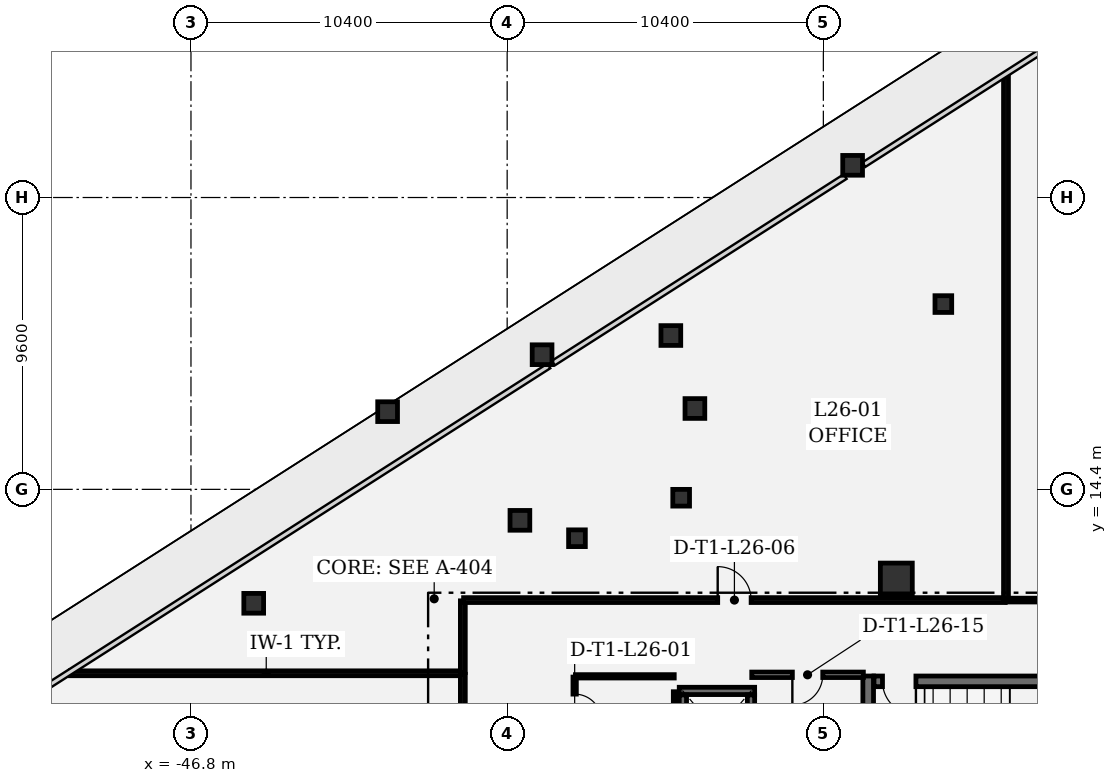
"""IFC4 building model, lengths in metres.
Left out: names, types, materials, properties, quantities, classifications, styles, units other than length and angle.
Written with IfcOpenShell. Run it as: python <this file> out.ifc"""

import sys

from ifc_helpers import new_model, si_unit, direction, frame, frame_2d, origin, origin_2d, place, context, subcontext, project, spatial, rectangle, extrude, element, fill, save


model = new_model("IFC4")
c1 = context("Model", 3, precision=1e-05, world=origin(), true_north=direction((0.0, 1.0)))
c2 = subcontext(c1, "Body", "Model", "MODEL_VIEW")
j1 = project(units=[si_unit("LENGTHUNIT", "METRE"), si_unit("PLANEANGLEUNIT", "RADIAN")], contexts=[c1])
p1 = place(None, origin())
s1 = spatial("IfcSite", under=j1, at=p1, CompositionType="ELEMENT")
p2 = place(p1, origin())
s2 = spatial("IfcBuilding", under=s1, at=p2, CompositionType="ELEMENT")
p3 = place(p2, frame((0.0, 0.0, 117.9)))
s3 = spatial("IfcBuildingStorey", under=s2, at=p3, CompositionType="ELEMENT", Elevation=117.9)
p4 = place(p3, frame((-23.6, 11.45, 0.0), z_axis=(0.0, 0.0, 1.0), x_axis=(1.0, 0.0, 0.0)))
e1 = element("IfcColumn", 1, at=p4, inside=s3, PredefinedType="COLUMN", context=c2, shape_type="SweptSolid", body=[
    extrude(rectangle(XDim=1.05, YDim=1.05, at=origin_2d()), origin(), (0.0, 0.0, 1.0), 4.05),
])
for number, where, z_axis, x_axis in (
    (2, (-40.333, 16.956, 0.0), (0.0, 0.0, 1.0), (1.0, 0.0, 0.0)),
    (3, (-35.252, 18.829, 0.0), (0.0, 0.0, 1.0), (1.0, 0.0, 0.0)),
    (4, (-25.038, 25.059, 0.0), (0.0, 0.0, 1.0), (1.0, 0.0, 0.0)),
    (5, (-31.016, 19.46, 0.0), (0.0, 0.0, 1.0), (1.0, 0.0, 0.0)),
    (6, (-44.736, 10.652, 0.0), (0.0, 0.0, 1.0), (1.0, 0.0, 0.0)),
    (7, (-35.981, 13.381, 0.0), (0.0, 0.0, 1.0), (1.0, 0.0, 0.0)),
    (8, (-30.225, 17.06, 0.0), (0.0, 0.0, 1.0), (1.0, 0.0, 0.0)),
):
    element("IfcColumn", number, at=place(p3, frame(where, z_axis=z_axis, x_axis=x_axis)), inside=s3, PredefinedType="COLUMN", context=c2, shape_type="SweptSolid", body=[
        extrude(rectangle(XDim=0.65, YDim=0.65, at=origin_2d()), origin(), (0.0, 0.0, 1.0), 4.05),
    ])
for number, where, z_axis, x_axis in (
    (9, (-34.104, 12.792, 0.0), (0.0, 0.0, 1.0), (1.0, 0.0, 0.0)),
    (10, (-22.053, 20.495, 0.0), (0.0, 0.0, 1.0), (1.0, 0.0, 0.0)),
    (11, (-30.677, 14.124, 0.0), (0.0, 0.0, 1.0), (1.0, 0.0, 0.0)),
):
    element("IfcColumn", number, at=place(p3, frame(where, z_axis=z_axis, x_axis=x_axis)), inside=s3, PredefinedType="COLUMN", context=c2, shape_type="SweptSolid", body=[
        extrude(rectangle(XDim=0.55, YDim=0.55, at=origin_2d()), origin(), (0.0, 0.0, 1.0), 4.05),
    ])
p5 = place(p3, frame((-24.525, 8.26, 0.0), z_axis=(0.0, 0.0, 1.0), x_axis=(0.0, -1.0, 0.0)))
e12 = element("IfcWall", 12, at=p5, inside=s3, PredefinedType="SHEAR", context=c2, shape_type="SweptSolid", body=[
    extrude(rectangle(XDim=4.21, YDim=0.35, at=frame_2d((2.105, 0.0))), origin(), (0.0, 0.0, 1.0), 3.77),
])
p6 = place(p3, frame((-16.215, 8.085, 0.0), z_axis=(0.0, 0.0, 1.0), x_axis=(-1.0, 0.0, 0.0)))
e13 = element("IfcWall", 13, at=p6, inside=s3, PredefinedType="SHEAR", context=c2, shape_type="SweptSolid", body=[
    extrude(rectangle(XDim=8.12, YDim=0.35, at=frame_2d((4.06, 0.0))), origin(), (0.0, 0.0, 1.0), 3.77),
])
p7 = place(p6, frame((6.74, 0.0, 0.0)))
e14 = element("IfcOpeningElement", 14, at=p7, cuts=e13, PredefinedType="OPENING", context=c2, shape_type="SweptSolid", body=[
    extrude(rectangle(XDim=1.1, YDim=2.2, at=frame_2d((0.55, 1.1))), frame((0.0, 0.185, 0.0), z_axis=(0.0, -1.0, 0.0), x_axis=(1.0, 0.0, 0.0)), (0.0, 0.0, 1.0), 0.37),
])
p8 = place(p3, frame((-30.74, 7.77, 0.0), z_axis=(0.0, 0.0, 1.0), x_axis=(1.0, 0.0, 0.0)))
e15 = element("IfcWall", 15, at=p8, inside=s3, PredefinedType="SHEAR", context=c2, shape_type="SweptSolid", body=[
    extrude(rectangle(XDim=2.48, YDim=0.24, at=frame_2d((1.24, 0.0))), origin(), (0.0, 0.0, 1.0), 3.77),
])
p9 = place(p3, frame((-30.62, 5.262, 0.0), z_axis=(0.0, 0.0, 1.0), x_axis=(0.0, 1.0, 0.0)))
e16 = element("IfcWall", 16, at=p9, inside=s3, PredefinedType="SHEAR", context=c2, shape_type="SweptSolid", body=[
    extrude(rectangle(XDim=2.376, YDim=0.24, at=frame_2d((1.188, 0.0))), origin(), (0.0, 0.0, 1.0), 3.77),
])
p10 = place(p3, frame((-28.38, 7.638, 0.0), z_axis=(0.0, 0.0, 1.0), x_axis=(0.0, -1.0, 0.0)))
e17 = element("IfcWall", 17, at=p10, inside=s3, PredefinedType="SHEAR", context=c2, shape_type="SweptSolid", body=[
    extrude(rectangle(XDim=2.376, YDim=0.24, at=frame_2d((1.188, 0.0))), origin(), (0.0, 0.0, 1.0), 3.77),
])
p11 = place(p10, frame((0.538, 0.0, 0.0)))
e18 = element("IfcOpeningElement", 18, at=p11, cuts=e17, PredefinedType="OPENING", context=c2, shape_type="SweptSolid", body=[
    extrude(rectangle(XDim=1.3, YDim=2.3, at=frame_2d((0.65, 1.15))), frame((0.0, 0.13, 0.0), z_axis=(0.0, -1.0, 0.0), x_axis=(1.0, 0.0, 0.0)), (0.0, 0.0, 1.0), 0.26),
])
p12 = place(p3, frame((-24.684, 8.3, 0.0), z_axis=(0.0, 0.0, 1.0), x_axis=(-1.0, 0.0, 0.0)))
e19 = element("IfcWall", 19, at=p12, inside=s3, PredefinedType="PARTITIONING", context=c2, shape_type="SweptSolid", body=[
    extrude(rectangle(XDim=3.671, YDim=0.18, at=frame_2d((1.835, 0.0))), origin(), (0.0, 0.0, 1.0), 3.77),
])
p13 = place(p12, frame((1.335, 0.0, 0.0)))
e20 = element("IfcOpeningElement", 20, at=p13, cuts=e19, PredefinedType="OPENING", context=c2, shape_type="SweptSolid", body=[
    extrude(rectangle(XDim=1.0, YDim=2.15, at=frame_2d((0.5, 1.075))), frame((0.0, 0.1, 0.0), z_axis=(0.0, -1.0, 0.0), x_axis=(1.0, 0.0, 0.0)), (0.0, 0.0, 1.0), 0.2),
])
p14 = place(p3, frame((-34.18, 8.225, 0.0), z_axis=(0.0, 0.0, 1.0), x_axis=(0.0, -1.0, 0.0)))
e21 = element("IfcWall", 21, at=p14, inside=s3, PredefinedType="PARTITIONING", context=c2, shape_type="SweptSolid", body=[
    extrude(rectangle(XDim=2.0, YDim=0.11, at=frame_2d((1.0, 0.0))), origin(), (0.0, 0.0, 1.0), 3.77),
])
p15 = place(p14, frame((0.56, 0.0, 0.0)))
e22 = element("IfcOpeningElement", 22, at=p15, cuts=e21, PredefinedType="OPENING", context=c2, shape_type="SweptSolid", body=[
    extrude(rectangle(XDim=0.88, YDim=2.1, at=frame_2d((0.44, 1.05))), frame((0.0, 0.065, 0.0), z_axis=(0.0, -1.0, 0.0), x_axis=(1.0, 0.0, 0.0)), (0.0, 0.0, 1.0), 0.13),
])
p16 = place(p3, frame((-30.88, 6.225, 0.0), z_axis=(0.0, 0.0, 1.0), x_axis=(0.0, 1.0, 0.0)))
e23 = element("IfcWall", 23, at=p16, inside=s3, PredefinedType="PARTITIONING", context=c2, shape_type="SweptSolid", body=[
    extrude(rectangle(XDim=1.518, YDim=0.11, at=frame_2d((0.759, 0.0))), origin(), (0.0, 0.0, 1.0), 3.77),
])
p17 = place(p3, frame((-30.905, 8.25, 0.0), z_axis=(0.0, 0.0, 1.0), x_axis=(-1.0, 0.0, 0.0)))
e24 = element("IfcWall", 24, at=p17, inside=s3, PredefinedType="PARTITIONING", context=c2, shape_type="SweptSolid", body=[
    extrude(rectangle(XDim=3.25, YDim=0.11, at=frame_2d((1.625, 0.0))), origin(), (0.0, 0.0, 1.0), 3.77),
])
p18 = place(p3, frame((-50.766, 8.35, 0.0), z_axis=(0.0, 0.0, 1.0), x_axis=(1.0, 0.0, 0.0)))
e25 = element("IfcWall", 25, at=p18, inside=s3, PredefinedType="PARTITIONING", context=c2, shape_type="SweptSolid", body=[
    extrude(rectangle(XDim=12.883, YDim=0.16, at=frame_2d((6.442, 0.0))), origin(), (0.0, 0.0, 1.0), 2.89),
])
p19 = place(p3, frame((-37.858, 10.733, 0.0), z_axis=(0.0, 0.0, 1.0), x_axis=(0.0, -1.0, 0.0)))
e26 = element("IfcWall", 26, at=p19, inside=s3, PredefinedType="PARTITIONING", context=c2, shape_type="SweptSolid", body=[
    extrude(rectangle(XDim=2.358, YDim=0.16, at=frame_2d((1.179, 0.0))), origin(), (0.0, 0.0, 1.0), 3.77),
])
p20 = place(p3, frame((-37.833, 10.758, 0.0), z_axis=(0.0, 0.0, 1.0), x_axis=(1.0, 0.0, 0.0)))
e27 = element("IfcWall", 27, at=p20, inside=s3, PredefinedType="PARTITIONING", context=c2, shape_type="SweptSolid", body=[
    extrude(rectangle(XDim=17.815, YDim=0.16, at=frame_2d((8.908, 0.0))), origin(), (0.0, 0.0, 1.0), 3.334),
])
p21 = place(p20, frame((8.358, 0.0, 0.0)))
e28 = element("IfcOpeningElement", 28, at=p21, cuts=e27, PredefinedType="OPENING", context=c2, shape_type="SweptSolid", body=[
    extrude(rectangle(XDim=1.1, YDim=2.15, at=frame_2d((0.55, 1.075))), frame((0.0, 0.09, 0.0), z_axis=(0.0, -1.0, 0.0), x_axis=(1.0, 0.0, 0.0)), (0.0, 0.0, 1.0), 0.18),
])
p22 = place(p3, frame((-19.993, 10.783, 0.0), z_axis=(0.0, 0.0, 1.0), x_axis=(0.0, 1.0, 0.0)))
e29 = element("IfcWall", 29, at=p22, inside=s3, PredefinedType="PARTITIONING", context=c2, shape_type="SweptSolid", body=[
    extrude(rectangle(XDim=17.206, YDim=0.16, at=frame_2d((8.603, 0.0))), origin(), (0.0, 0.0, 1.0), 2.885),
])
p23 = place(p3, frame((-19.96, 10.758, 0.0), z_axis=(0.0, 0.0, 1.0), x_axis=(1.0, 0.0, 0.0)))
e30 = element("IfcWall", 30, at=p23, inside=s3, PredefinedType="PARTITIONING", context=c2, shape_type="SweptSolid", body=[
    extrude(rectangle(XDim=23.24, YDim=0.125, at=frame_2d((11.62, 0.0))), origin(), (0.0, 0.0, 1.0), 2.885),
])
p24 = place(p23, frame((11.145, 0.0, 0.0)))
e31 = element("IfcOpeningElement", 31, at=p24, cuts=e30, PredefinedType="OPENING", context=c2, shape_type="SweptSolid", body=[
    extrude(rectangle(XDim=0.95, YDim=2.15, at=frame_2d((0.475, 1.075))), frame((0.0, 0.073, 0.0), z_axis=(0.0, -1.0, 0.0), x_axis=(1.0, 0.0, 0.0)), (0.0, 0.0, 1.0), 0.145),
])
p25 = place(p3, frame((-37.858, 4.783, 0.0), z_axis=(0.0, 0.0, 1.0), x_axis=(0.0, 1.0, 0.0)))
e32 = element("IfcWall", 32, at=p25, inside=s3, PredefinedType="PARTITIONING", context=c2, shape_type="SweptSolid", body=[
    extrude(rectangle(XDim=3.534, YDim=0.16, at=frame_2d((1.767, 0.0))), origin(), (0.0, 0.0, 1.0), 3.77),
])
p26 = place(p25, frame((1.217, 0.0, 0.0)))
e33 = element("IfcOpeningElement", 33, at=p26, cuts=e32, PredefinedType="OPENING", context=c2, shape_type="SweptSolid", body=[
    extrude(rectangle(XDim=1.1, YDim=2.15, at=frame_2d((0.55, 1.075))), frame((0.0, 0.09, 0.0), z_axis=(0.0, -1.0, 0.0), x_axis=(1.0, 0.0, 0.0)), (0.0, 0.0, 1.0), 0.18),
])
p27 = place(p7, origin())
e34 = element("IfcDoor", 34, at=p27, inside=s3, OperationType="SINGLE_SWING_LEFT", PredefinedType="DOOR", context=c2, shape_type="SweptSolid", body=[
    extrude(rectangle(XDim=1.1, YDim=2.2, at=frame_2d((0.55, 1.1))), frame((0.0, 0.025, 0.0), z_axis=(0.0, -1.0, 0.0), x_axis=(1.0, 0.0, 0.0)), (0.0, 0.0, 1.0), 0.05),
])
fill(e14, e34)
p28 = place(p15, origin())
e35 = element("IfcDoor", 35, at=p28, inside=s3, OperationType="SINGLE_SWING_RIGHT", PredefinedType="DOOR", context=c2, shape_type="SweptSolid", body=[
    extrude(rectangle(XDim=0.88, YDim=2.1, at=frame_2d((0.44, 1.05))), frame((0.0, 0.025, 0.0), z_axis=(0.0, -1.0, 0.0), x_axis=(1.0, 0.0, 0.0)), (0.0, 0.0, 1.0), 0.05),
])
fill(e22, e35)
p29 = place(p21, origin())
e36 = element("IfcDoor", 36, at=p29, inside=s3, OperationType="SINGLE_SWING_LEFT", PredefinedType="DOOR", context=c2, shape_type="SweptSolid", body=[
    extrude(rectangle(XDim=1.1, YDim=2.15, at=frame_2d((0.55, 1.075))), frame((0.0, 0.025, 0.0), z_axis=(0.0, -1.0, 0.0), x_axis=(1.0, 0.0, 0.0)), (0.0, 0.0, 1.0), 0.05),
])
fill(e28, e36)
p30 = place(p13, origin())
e37 = element("IfcDoor", 37, at=p30, inside=s3, OperationType="SINGLE_SWING_RIGHT", PredefinedType="DOOR", context=c2, shape_type="SweptSolid", body=[
    extrude(rectangle(XDim=1.0, YDim=2.15, at=frame_2d((0.5, 1.075))), frame((0.0, 0.025, 0.0), z_axis=(0.0, -1.0, 0.0), x_axis=(1.0, 0.0, 0.0)), (0.0, 0.0, 1.0), 0.05),
])
fill(e20, e37)
save(model, sys.argv[1])
